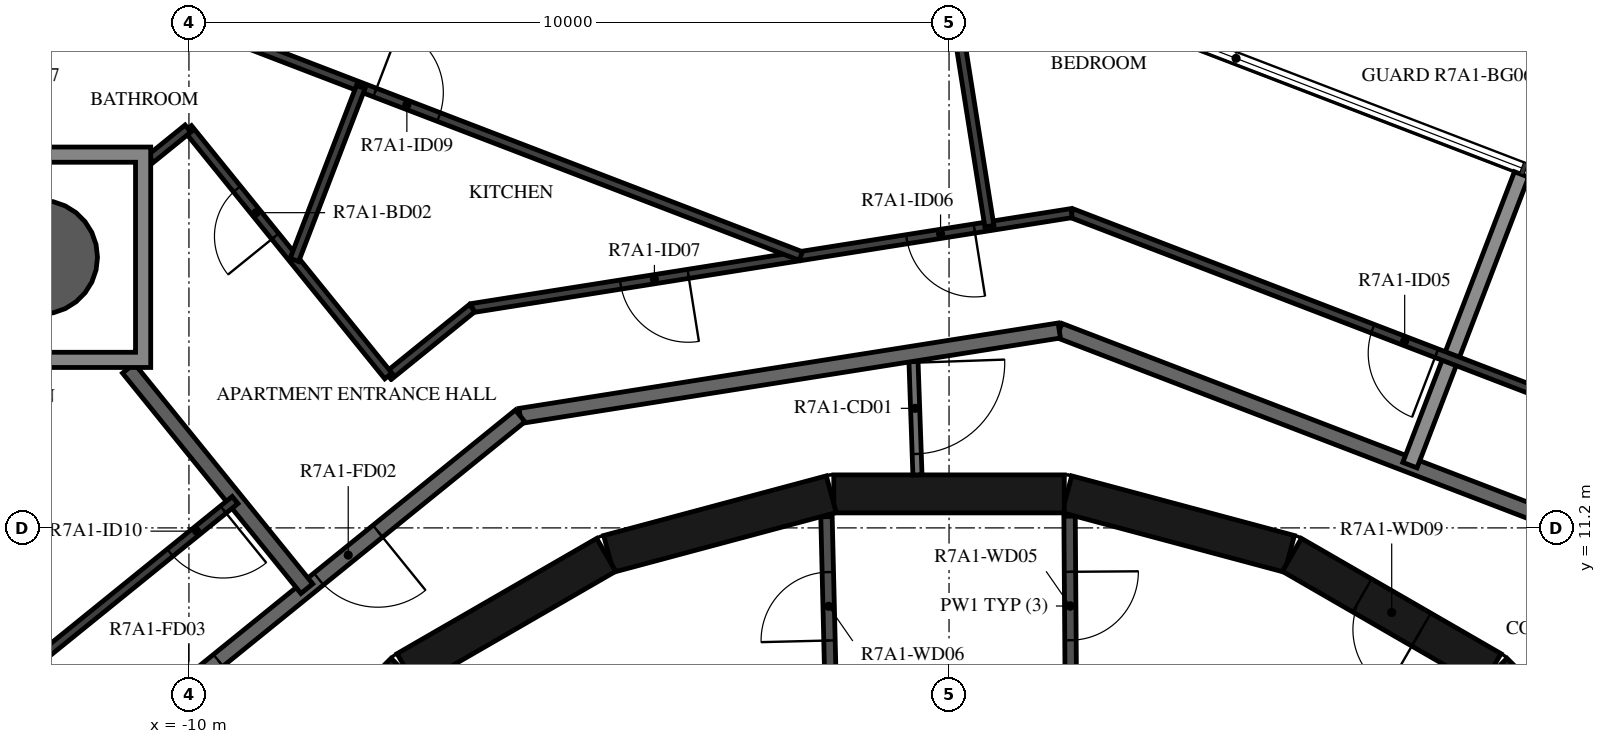
"""IFC4 building model, lengths in metres.
Left out: names, types, materials, properties, quantities, classifications, styles, units other than length and angle.
Written with IfcOpenShell. Run it as: python <this file> out.ifc"""

import sys

from ifc_helpers import new_model, si_unit, direction, frame, frame_2d, origin, origin_2d, place, context, subcontext, project, spatial, polyline, rectangle, hollow_circle, outline, extrude, element, fill, save


model = new_model("IFC4")
c1 = context("Model", 3, precision=1e-05, world=origin(), true_north=direction((0.0, 1.0)))
c2 = subcontext(c1, "Body", "Model", "MODEL_VIEW")
j1 = project(units=[si_unit("LENGTHUNIT", "METRE"), si_unit("PLANEANGLEUNIT", "RADIAN")], contexts=[c1])
p1 = place(None, origin())
s1 = spatial("IfcSite", under=j1, at=p1, CompositionType="ELEMENT")
p2 = place(p1, origin())
s2 = spatial("IfcBuilding", under=s1, at=p2, CompositionType="ELEMENT")
p3 = place(p2, frame((0.0, 0.0, 266.9)))
s3 = spatial("IfcBuildingStorey", under=s2, at=p3, CompositionType="ELEMENT", Elevation=266.9)
p4 = place(p3, frame((-11.953, 14.76, -0.38), z_axis=(0.0, 0.0, 1.0), x_axis=(1.0, 0.0, 0.0)))
e1 = element("IfcColumn", 1, at=p4, inside=s3, PredefinedType="COLUMN", context=c2, shape_type="SweptSolid", body=[
    extrude(hollow_circle(Radius=0.75, WallThickness=0.035, at=origin_2d()), origin(), (0.0, 0.0, 1.0), 3.5),
])
p5 = place(p3, frame((9.308, 7.164, 0.0), z_axis=(0.0, 0.0, 1.0), x_axis=(-0.707106781187, 0.707106781187, 0.0)))
e2 = element("IfcWall", 2, at=p5, inside=s3, PredefinedType="SHEAR", context=c2, shape_type="SweptSolid", body=[
    extrude(rectangle(XDim=3.032, YDim=0.5, at=frame_2d((1.516, 0.0))), origin(), (0.0, 0.0, 1.0), 3.12),
])
p6 = place(p5, frame((0.416, 0.0, 0.0)))
e3 = element("IfcOpeningElement", 3, at=p6, cuts=e2, PredefinedType="OPENING", context=c2, shape_type="SweptSolid", body=[
    extrude(rectangle(XDim=1.2, YDim=2.1, at=frame_2d((0.6, 1.05))), frame((0.0, 0.26, 0.0), z_axis=(0.0, -1.0, 0.0), x_axis=(1.0, 0.0, 0.0)), (0.0, 0.0, 1.0), 0.52),
])
p7 = place(p3, frame((7.137, 9.329, 0.0), z_axis=(0.0, 0.0, 1.0), x_axis=(-0.865975092491, 0.500087131594, 0.0)))
e4 = element("IfcWall", 4, at=p7, inside=s3, PredefinedType="SHEAR", context=c2, shape_type="SweptSolid", body=[
    extrude(rectangle(XDim=3.033, YDim=0.5, at=frame_2d((1.516, 0.0))), origin(), (0.0, 0.0, 1.0), 3.12),
])
p8 = place(p7, frame((1.066, 0.0, 0.0)))
e5 = element("IfcOpeningElement", 5, at=p8, cuts=e4, PredefinedType="OPENING", context=c2, shape_type="SweptSolid", body=[
    extrude(rectangle(XDim=0.9, YDim=2.1, at=frame_2d((0.45, 1.05))), frame((0.0, 0.26, 0.0), z_axis=(0.0, -1.0, 0.0), x_axis=(1.0, 0.0, 0.0)), (0.0, 0.0, 1.0), 0.52),
])
for number, where, z_axis, x_axis in (
    (6, (4.479, 10.858, 0.0), (0.0, 0.0, 1.0), (-0.966, 0.259, 0.0)),
    (7, (1.516, 11.647, 0.0), (0.0, 0.0, 1.0), (-1.0, 0.0, 0.0)),
    (8, (-1.55, 11.643, 0.0), (0.0, 0.0, 1.0), (-0.966, -0.259, 0.0)),
    (9, (-4.51, 10.845, 0.0), (0.0, 0.0, 1.0), (-0.866, -0.5, 0.0)),
):
    element("IfcWall", number, at=place(p3, frame(where, z_axis=z_axis, x_axis=x_axis)), inside=s3, PredefinedType="SHEAR", context=c2, shape_type="SweptSolid", body=[
        extrude(rectangle(XDim=3.033, YDim=0.5, at=frame_2d((1.516, 0.0))), origin(), (0.0, 0.0, 1.0), 3.12),
    ])
p9 = place(p3, frame((-7.164, 9.308, 0.0), z_axis=(0.0, 0.0, 1.0), x_axis=(-0.707106781187, -0.707106781187, 0.0)))
e10 = element("IfcWall", 10, at=p9, inside=s3, PredefinedType="SHEAR", context=c2, shape_type="SweptSolid", body=[
    extrude(rectangle(XDim=3.032, YDim=0.5, at=frame_2d((1.516, 0.0))), origin(), (0.0, 0.0, 1.0), 3.12),
])
p10 = place(p9, frame((1.416, 0.0, 0.0)))
e11 = element("IfcOpeningElement", 11, at=p10, cuts=e10, PredefinedType="OPENING", context=c2, shape_type="SweptSolid", body=[
    extrude(rectangle(XDim=1.2, YDim=2.1, at=frame_2d((0.6, 1.05))), frame((0.0, 0.26, 0.0), z_axis=(0.0, -1.0, 0.0), x_axis=(1.0, 0.0, 0.0)), (0.0, 0.0, 1.0), 0.52),
])
p11 = place(p3, frame((1.586, 11.354, 0.0), z_axis=(0.0, 0.0, 1.0), x_axis=(0.007227482881, -0.999973881405, 0.0)))
e12 = element("IfcWall", 12, at=p11, inside=s3, PredefinedType="PARTITIONING", context=c2, shape_type="SweptSolid", body=[
    extrude(rectangle(XDim=2.365, YDim=0.15, at=frame_2d((1.182, 0.0))), origin(), (0.0, 0.0, 1.0), 3.12),
])
p12 = place(p11, frame((0.732, 0.0, 0.0)))
e13 = element("IfcOpeningElement", 13, at=p12, cuts=e12, PredefinedType="OPENING", context=c2, shape_type="SweptSolid", body=[
    extrude(rectangle(XDim=0.9, YDim=2.1, at=frame_2d((0.45, 1.05))), frame((0.0, 0.085, 0.0), z_axis=(0.0, -1.0, 0.0), x_axis=(1.0, 0.0, 0.0)), (0.0, 0.0, 1.0), 0.17),
])
p13 = place(p3, frame((-1.555, 8.99, 0.0), z_axis=(0.0, 0.0, 1.0), x_axis=(-0.024125549686, 0.999708936567, 0.0)))
e14 = element("IfcWall", 14, at=p13, inside=s3, PredefinedType="PARTITIONING", context=c2, shape_type="SweptSolid", body=[
    extrude(rectangle(XDim=2.358, YDim=0.15, at=frame_2d((1.179, 0.0))), origin(), (0.0, 0.0, 1.0), 3.12),
])
p14 = place(p13, frame((0.729, 0.0, 0.0)))
e15 = element("IfcOpeningElement", 15, at=p14, cuts=e14, PredefinedType="OPENING", context=c2, shape_type="SweptSolid", body=[
    extrude(rectangle(XDim=0.9, YDim=2.1, at=frame_2d((0.45, 1.05))), frame((0.0, 0.085, 0.0), z_axis=(0.0, -1.0, 0.0), x_axis=(1.0, 0.0, 0.0)), (0.0, 0.0, 1.0), 0.17),
])
p15 = place(p3, frame((-0.471, 13.492, 0.0), z_axis=(0.0, 0.0, 1.0), x_axis=(0.034873173869, -0.999391745886, 0.0)))
e16 = element("IfcWall", 16, at=p15, inside=s3, PredefinedType="PARTITIONING", context=c2, shape_type="SweptSolid", body=[
    extrude(rectangle(XDim=1.596, YDim=0.12, at=frame_2d((0.798, 0.0))), origin(), (0.0, 0.0, 1.0), 3.12),
])
p16 = place(p15, frame((0.12, 0.0, 0.0)))
e17 = element("IfcOpeningElement", 17, at=p16, cuts=e16, PredefinedType="OPENING", context=c2, shape_type="SweptSolid", body=[
    extrude(rectangle(XDim=1.2, YDim=2.1, at=frame_2d((0.6, 1.05))), frame((0.0, 0.07, 0.0), z_axis=(0.0, -1.0, 0.0), x_axis=(1.0, 0.0, 0.0)), (0.0, 0.0, 1.0), 0.14),
])
p17 = place(p3, frame((8.154, 11.223, 0.0), z_axis=(0.0, 0.0, 1.0), x_axis=(-0.93359073609, 0.358341090983, 0.0)))
e18 = element("IfcWall", 18, at=p17, inside=s3, PredefinedType="STANDARD", context=c2, shape_type="SweptSolid", body=[
    extrude(rectangle(XDim=7.181, YDim=0.2, at=frame_2d((3.59, 0.0))), origin(), (0.0, 0.0, 1.0), 3.12),
])
p18 = place(p3, frame((1.45, 13.797, 0.0), z_axis=(0.0, 0.0, 1.0), x_axis=(-0.987690361611, -0.156421704315, 0.0)))
e19 = element("IfcWall", 19, at=p18, inside=s3, PredefinedType="STANDARD", context=c2, shape_type="SweptSolid", body=[
    extrude(rectangle(XDim=7.181, YDim=0.2, at=frame_2d((3.591, 0.0))), origin(), (0.0, 0.0, 1.0), 3.12),
])
p19 = place(p3, frame((-5.643, 12.673, 0.0), z_axis=(0.0, 0.0, 1.0), x_axis=(-0.777160148113, -0.629302871585, 0.0)))
e20 = element("IfcWall", 20, at=p19, inside=s3, PredefinedType="STANDARD", context=c2, shape_type="SweptSolid", body=[
    extrude(rectangle(XDim=7.181, YDim=0.2, at=frame_2d((3.59, 0.0))), origin(), (0.0, 0.0, 1.0), 3.12),
])
p20 = place(p19, frame((2.41, 0.0, 0.0)))
e21 = element("IfcOpeningElement", 21, at=p20, cuts=e20, PredefinedType="OPENING", context=c2, shape_type="SweptSolid", body=[
    extrude(rectangle(XDim=1.0, YDim=2.1, at=frame_2d((0.5, 1.05))), frame((0.0, 0.11, 0.0), z_axis=(0.0, -1.0, 0.0), x_axis=(1.0, 0.0, 0.0)), (0.0, 0.0, 1.0), 0.22),
])
p21 = place(p19, frame((5.112, 0.0, 0.0)))
e22 = element("IfcOpeningElement", 22, at=p21, cuts=e20, PredefinedType="OPENING", context=c2, shape_type="SweptSolid", body=[
    extrude(rectangle(XDim=1.0, YDim=2.1, at=frame_2d((0.5, 1.05))), frame((0.0, 0.11, 0.0), z_axis=(0.0, -1.0, 0.0), x_axis=(1.0, 0.0, 0.0)), (0.0, 0.0, 1.0), 0.22),
])
p22 = place(p3, frame((7.532, 15.85, 0.0), z_axis=(0.0, 0.0, 1.0), x_axis=(-0.358355996975, -0.933585014571, 0.0)))
e23 = element("IfcWall", 23, at=p22, inside=s3, PredefinedType="STANDARD", context=c2, shape_type="SweptSolid", body=[
    extrude(rectangle(XDim=4.096, YDim=0.2, at=frame_2d((2.048, 0.0))), origin(), (0.0, 0.0, 1.0), 2.73),
])
p23 = place(p3, frame((-10.796, 13.299, 0.0), z_axis=(0.0, 0.0, 1.0), x_axis=(0.629290499381, -0.777170166301, 0.0)))
e24 = element("IfcWall", 24, at=p23, inside=s3, PredefinedType="STANDARD", context=c2, shape_type="SweptSolid", body=[
    extrude(rectangle(XDim=3.729, YDim=0.2, at=frame_2d((1.865, 0.0))), origin(), (0.0, 0.0, 1.0), 3.12),
])
p24 = place(p3, frame((9.067, 12.479, 0.0), z_axis=(0.0, 0.0, 1.0), x_axis=(-0.933579449035, 0.358370495911, 0.0)))
e25 = element("IfcWall", 25, at=p24, inside=s3, PredefinedType="PARTITIONING", context=c2, shape_type="SweptSolid", body=[
    extrude(rectangle(XDim=7.985, YDim=0.12, at=frame_2d((3.992, 0.0))), origin(), (0.0, 0.0, 1.0), 3.12),
])
p25 = place(p24, frame((2.841, 0.0, 0.0)))
e26 = element("IfcOpeningElement", 26, at=p25, cuts=e25, PredefinedType="OPENING", context=c2, shape_type="SweptSolid", body=[
    extrude(rectangle(XDim=0.9, YDim=2.1, at=frame_2d((0.45, 1.05))), frame((0.0, 0.07, 0.0), z_axis=(0.0, -1.0, 0.0), x_axis=(1.0, 0.0, 0.0)), (0.0, 0.0, 1.0), 0.14),
])
p26 = place(p3, frame((1.612, 15.341, 0.0), z_axis=(0.0, 0.0, 1.0), x_axis=(-0.987689722749, -0.156425738216, 0.0)))
e27 = element("IfcWall", 27, at=p26, inside=s3, PredefinedType="PARTITIONING", context=c2, shape_type="SweptSolid", body=[
    extrude(rectangle(XDim=7.985, YDim=0.12, at=frame_2d((3.992, 0.0))), origin(), (0.0, 0.0, 1.0), 3.12),
])
p27 = place(p26, frame((1.295, 0.0, 0.0)))
e28 = element("IfcOpeningElement", 28, at=p27, cuts=e27, PredefinedType="OPENING", context=c2, shape_type="SweptSolid", body=[
    extrude(rectangle(XDim=0.9, YDim=2.1, at=frame_2d((0.45, 1.05))), frame((0.0, 0.07, 0.0), z_axis=(0.0, -1.0, 0.0), x_axis=(1.0, 0.0, 0.0)), (0.0, 0.0, 1.0), 0.14),
])
p28 = place(p26, frame((5.107, 0.0, 0.0)))
e29 = element("IfcOpeningElement", 29, at=p28, cuts=e27, PredefinedType="OPENING", context=c2, shape_type="SweptSolid", body=[
    extrude(rectangle(XDim=0.9, YDim=2.1, at=frame_2d((0.45, 1.05))), frame((0.0, 0.07, 0.0), z_axis=(0.0, -1.0, 0.0), x_axis=(1.0, 0.0, 0.0)), (0.0, 0.0, 1.0), 0.14),
])
p29 = place(p3, frame((-6.274, 14.092, 0.0), z_axis=(0.0, 0.0, 1.0), x_axis=(-0.777144673245, -0.629321981855, 0.0)))
e30 = element("IfcWall", 30, at=p29, inside=s3, PredefinedType="PARTITIONING", context=c2, shape_type="SweptSolid", body=[
    extrude(rectangle(XDim=1.419, YDim=0.12, at=frame_2d((0.709, 0.0))), origin(), (0.0, 0.0, 1.0), 3.12),
])
p30 = place(p3, frame((-7.377, 13.199, 0.0), z_axis=(0.0, 0.0, 1.0), x_axis=(-0.629382670352, 0.77709552454, 0.0)))
e31 = element("IfcWall", 31, at=p30, inside=s3, PredefinedType="PARTITIONING", context=c2, shape_type="SweptSolid", body=[
    extrude(rectangle(XDim=4.188, YDim=0.12, at=frame_2d((2.094, 0.0))), origin(), (0.0, 0.0, 1.0), 3.12),
])
p31 = place(p30, frame((2.364, 0.0, 0.0)))
e32 = element("IfcOpeningElement", 32, at=p31, cuts=e31, PredefinedType="OPENING", context=c2, shape_type="SweptSolid", body=[
    extrude(rectangle(XDim=0.8, YDim=2.1, at=frame_2d((0.4, 1.05))), frame((0.0, 0.07, 0.0), z_axis=(0.0, -1.0, 0.0), x_axis=(1.0, 0.0, 0.0)), (0.0, 0.0, 1.0), 0.14),
])
p32 = place(p3, frame((-10.013, 16.454, 0.0), z_axis=(0.0, 0.0, 1.0), x_axis=(-0.777001388062, -0.629498882406, 0.0)))
e33 = element("IfcWall", 33, at=p32, inside=s3, PredefinedType="PARTITIONING", context=c2, shape_type="SweptSolid", body=[
    extrude(rectangle(XDim=0.631, YDim=0.12, at=frame_2d((0.315, 0.0))), origin(), (0.0, 0.0, 1.0), 3.12),
])
p33 = place(p3, frame((-0.037, 18.756, 0.0), z_axis=(0.0, 0.0, 1.0), x_axis=(0.156421851095, -0.987690338365, 0.0)))
e34 = element("IfcWall", 34, at=p33, inside=s3, PredefinedType="PARTITIONING", context=c2, shape_type="SweptSolid", body=[
    extrude(rectangle(XDim=3.63, YDim=0.12, at=frame_2d((1.815, 0.0))), origin(), (0.0, 0.0, 1.0), 3.12),
])
p34 = place(p3, frame((-10.289, 17.978, 0.0), z_axis=(0.0, 0.0, 1.0), x_axis=(0.933579293595, -0.358370900844, 0.0)))
e35 = element("IfcWall", 35, at=p34, inside=s3, PredefinedType="PARTITIONING", context=c2, shape_type="SweptSolid", body=[
    extrude(rectangle(XDim=8.932, YDim=0.12, at=frame_2d((4.466, 0.0))), origin(), (0.0, 0.0, 1.0), 3.12),
])
p35 = place(p34, frame((2.93, 0.0, 0.0)))
e36 = element("IfcOpeningElement", 36, at=p35, cuts=e35, PredefinedType="OPENING", context=c2, shape_type="SweptSolid", body=[
    extrude(rectangle(XDim=0.9, YDim=2.1, at=frame_2d((0.45, 1.05))), frame((0.0, 0.07, 0.0), z_axis=(0.0, -1.0, 0.0), x_axis=(1.0, 0.0, 0.0)), (0.0, 0.0, 1.0), 0.14),
])
p36 = place(p3, frame((-7.74, 17.0, 0.0), z_axis=(0.0, 0.0, 1.0), x_axis=(-0.358394723652, -0.93357014844, 0.0)))
e37 = element("IfcWall", 37, at=p36, inside=s3, PredefinedType="PARTITIONING", context=c2, shape_type="SweptSolid", body=[
    extrude(rectangle(XDim=2.436, YDim=0.12, at=frame_2d((1.218, 0.0))), origin(), (0.0, 0.0, 1.0), 3.12),
])
p37 = place(p3, frame((-9.393, 11.566, 0.0), z_axis=(0.0, 0.0, 1.0), x_axis=(-0.777100258587, -0.629376825205, 0.0)))
e38 = element("IfcWall", 38, at=p37, inside=s3, PredefinedType="PARTITIONING", context=c2, shape_type="SweptSolid", body=[
    extrude(rectangle(XDim=3.971, YDim=0.12, at=frame_2d((1.986, 0.0))), origin(), (0.0, 0.0, 1.0), 3.12),
])
p38 = place(p37, frame((0.2, 0.0, 0.0)))
e39 = element("IfcOpeningElement", 39, at=p38, cuts=e38, PredefinedType="OPENING", context=c2, shape_type="SweptSolid", body=[
    extrude(rectangle(XDim=0.9, YDim=2.1, at=frame_2d((0.45, 1.05))), frame((0.0, 0.07, 0.0), z_axis=(0.0, -1.0, 0.0), x_axis=(1.0, 0.0, 0.0)), (0.0, 0.0, 1.0), 0.14),
])
p39 = place(p3, origin())
e40 = element("IfcWall", 40, at=p39, inside=s3, PredefinedType="STANDARD", context=c2, shape_type="SweptSolid", body=[
    extrude(outline(polyline([(-10.503, 16.21), (-10.503, 13.311), (-13.403, 13.311), (-13.403, 16.21), (-10.503, 16.21)]), holes=[polyline([(-13.203, 13.51), (-10.703, 13.51), (-10.703, 16.01), (-13.203, 16.01), (-13.203, 13.51)])]), origin(), (0.0, 0.0, 1.0), 3.12),
])
p40 = place(p12, origin())
e41 = element("IfcDoor", 41, at=p40, inside=s3, OperationType="SINGLE_SWING_LEFT", PredefinedType="DOOR", context=c2, shape_type="SweptSolid", body=[
    extrude(rectangle(XDim=0.9, YDim=2.1, at=frame_2d((0.45, 1.05))), frame((0.0, 0.025, 0.0), z_axis=(0.0, -1.0, 0.0), x_axis=(1.0, 0.0, 0.0)), (0.0, 0.0, 1.0), 0.05),
])
fill(e13, e41)
p41 = place(p14, origin())
e42 = element("IfcDoor", 42, at=p41, inside=s3, OperationType="SINGLE_SWING_RIGHT", PredefinedType="DOOR", context=c2, shape_type="SweptSolid", body=[
    extrude(rectangle(XDim=0.9, YDim=2.1, at=frame_2d((0.45, 1.05))), frame((0.0, 0.025, 0.0), z_axis=(0.0, -1.0, 0.0), x_axis=(1.0, 0.0, 0.0)), (0.0, 0.0, 1.0), 0.05),
])
fill(e15, e42)
p42 = place(p8, origin())
e43 = element("IfcDoor", 43, at=p42, inside=s3, OperationType="SINGLE_SWING_LEFT", PredefinedType="DOOR", context=c2, shape_type="SweptSolid", body=[
    extrude(rectangle(XDim=0.9, YDim=2.1, at=frame_2d((0.45, 1.05))), frame((0.0, 0.025, 0.0), z_axis=(0.0, -1.0, 0.0), x_axis=(1.0, 0.0, 0.0)), (0.0, 0.0, 1.0), 0.05),
])
fill(e5, e43)
p43 = place(p20, origin())
e44 = element("IfcDoor", 44, at=p43, inside=s3, OperationType="SINGLE_SWING_RIGHT", PredefinedType="DOOR", context=c2, shape_type="SweptSolid", body=[
    extrude(rectangle(XDim=1.0, YDim=2.1, at=frame_2d((0.5, 1.05))), frame((0.0, 0.025, 0.0), z_axis=(0.0, -1.0, 0.0), x_axis=(1.0, 0.0, 0.0)), (0.0, 0.0, 1.0), 0.05),
])
fill(e21, e44)
p44 = place(p25, origin())
e45 = element("IfcDoor", 45, at=p44, inside=s3, OperationType="SINGLE_SWING_LEFT", PredefinedType="DOOR", context=c2, shape_type="SweptSolid", body=[
    extrude(rectangle(XDim=0.9, YDim=2.1, at=frame_2d((0.45, 1.05))), frame((0.0, 0.025, 0.0), z_axis=(0.0, -1.0, 0.0), x_axis=(1.0, 0.0, 0.0)), (0.0, 0.0, 1.0), 0.05),
])
fill(e26, e45)
p45 = place(p27, origin())
e46 = element("IfcDoor", 46, at=p45, inside=s3, OperationType="SINGLE_SWING_RIGHT", PredefinedType="DOOR", context=c2, shape_type="SweptSolid", body=[
    extrude(rectangle(XDim=0.9, YDim=2.1, at=frame_2d((0.45, 1.05))), frame((0.0, 0.025, 0.0), z_axis=(0.0, -1.0, 0.0), x_axis=(1.0, 0.0, 0.0)), (0.0, 0.0, 1.0), 0.05),
])
fill(e28, e46)
p46 = place(p28, origin())
e47 = element("IfcDoor", 47, at=p46, inside=s3, OperationType="SINGLE_SWING_RIGHT", PredefinedType="DOOR", context=c2, shape_type="SweptSolid", body=[
    extrude(rectangle(XDim=0.9, YDim=2.1, at=frame_2d((0.45, 1.05))), frame((0.0, 0.025, 0.0), z_axis=(0.0, -1.0, 0.0), x_axis=(1.0, 0.0, 0.0)), (0.0, 0.0, 1.0), 0.05),
])
fill(e29, e47)
p47 = place(p31, origin())
e48 = element("IfcDoor", 48, at=p47, inside=s3, OperationType="SINGLE_SWING_RIGHT", PredefinedType="DOOR", context=c2, shape_type="SweptSolid", body=[
    extrude(rectangle(XDim=0.8, YDim=2.1, at=frame_2d((0.4, 1.05))), frame((0.0, 0.025, 0.0), z_axis=(0.0, -1.0, 0.0), x_axis=(1.0, 0.0, 0.0)), (0.0, 0.0, 1.0), 0.05),
])
fill(e32, e48)
p48 = place(p35, origin())
e49 = element("IfcDoor", 49, at=p48, inside=s3, OperationType="SINGLE_SWING_LEFT", PredefinedType="DOOR", context=c2, shape_type="SweptSolid", body=[
    extrude(rectangle(XDim=0.9, YDim=2.1, at=frame_2d((0.45, 1.05))), frame((0.0, 0.025, 0.0), z_axis=(0.0, -1.0, 0.0), x_axis=(1.0, 0.0, 0.0)), (0.0, 0.0, 1.0), 0.05),
])
fill(e36, e49)
p49 = place(p21, origin())
e50 = element("IfcDoor", 50, at=p49, inside=s3, OperationType="SINGLE_SWING_LEFT", PredefinedType="DOOR", context=c2, shape_type="SweptSolid", body=[
    extrude(rectangle(XDim=1.0, YDim=2.1, at=frame_2d((0.5, 1.05))), frame((0.0, 0.025, 0.0), z_axis=(0.0, -1.0, 0.0), x_axis=(1.0, 0.0, 0.0)), (0.0, 0.0, 1.0), 0.05),
])
fill(e22, e50)
p50 = place(p38, origin())
e51 = element("IfcDoor", 51, at=p50, inside=s3, OperationType="SINGLE_SWING_LEFT", PredefinedType="DOOR", context=c2, shape_type="SweptSolid", body=[
    extrude(rectangle(XDim=0.9, YDim=2.1, at=frame_2d((0.45, 1.05))), frame((0.0, 0.025, 0.0), z_axis=(0.0, -1.0, 0.0), x_axis=(1.0, 0.0, 0.0)), (0.0, 0.0, 1.0), 0.05),
])
fill(e39, e51)
p51 = place(p16, origin())
e52 = element("IfcDoor", 52, at=p51, inside=s3, OperationType="DOUBLE_DOOR_SINGLE_SWING", PredefinedType="DOOR", context=c2, shape_type="SweptSolid", body=[
    extrude(rectangle(XDim=1.2, YDim=2.1, at=frame_2d((0.6, 1.05))), frame((0.0, 0.025, 0.0), z_axis=(0.0, -1.0, 0.0), x_axis=(1.0, 0.0, 0.0)), (0.0, 0.0, 1.0), 0.05),
])
fill(e17, e52)
save(model, sys.argv[1])
